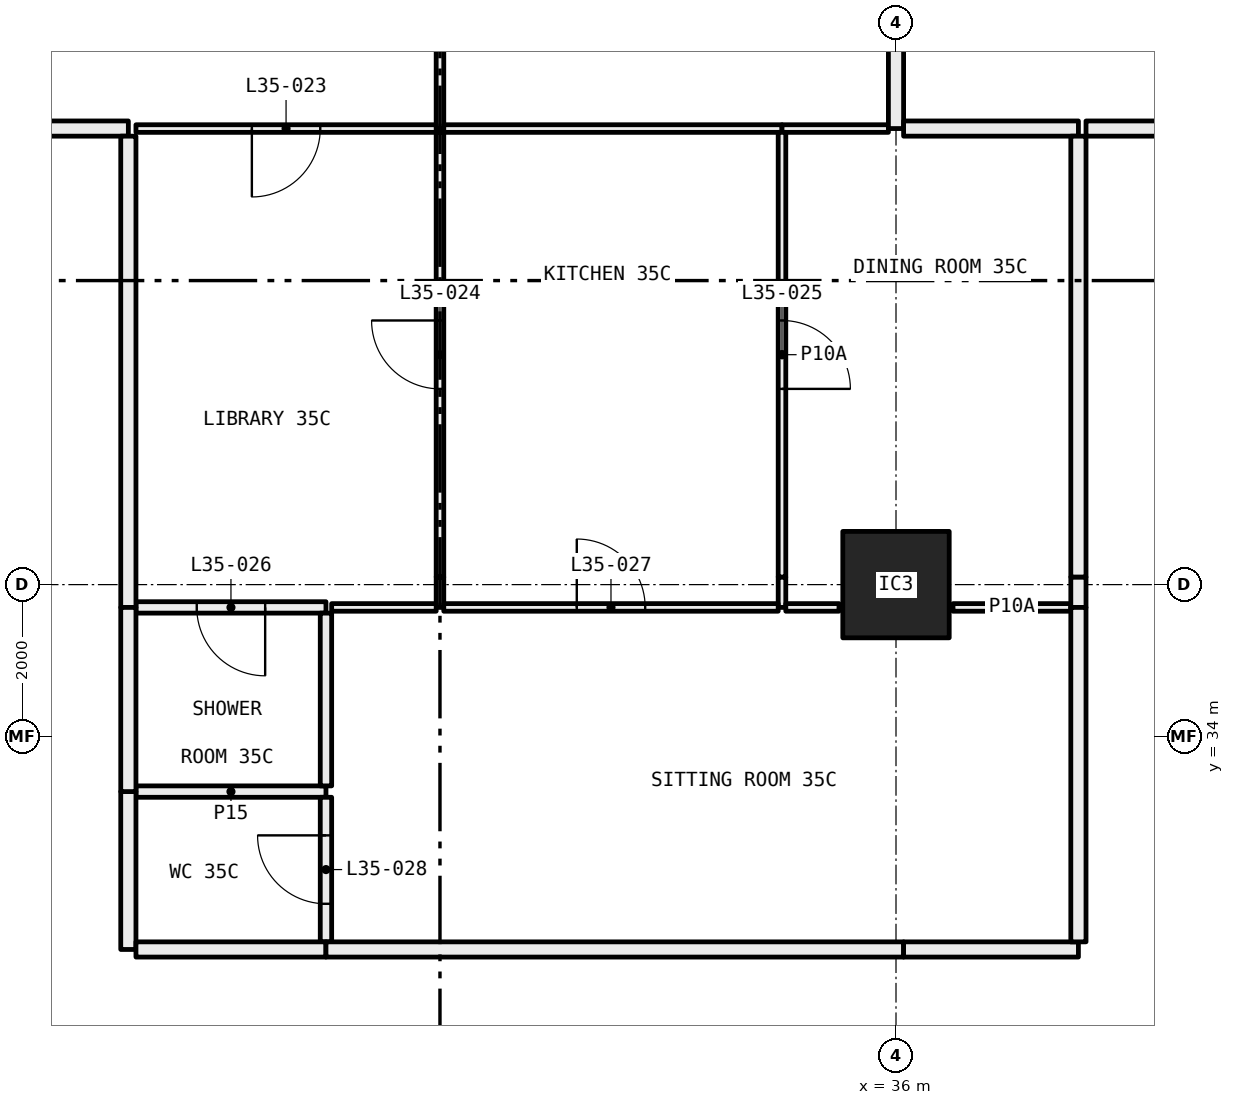
"""IFC4 building model, lengths in metres.
Left out: names, types, materials, properties, quantities, classifications, styles, units other than length and angle.
Written with IfcOpenShell. Run it as: python <this file> out.ifc"""

import sys

from ifc_helpers import new_model, si_unit, direction, frame, frame_2d, origin, origin_2d, place, context, subcontext, project, spatial, rectangle, hollow_rectangle, extrude, element, fill, save


model = new_model("IFC4")
c1 = context("Model", 3, precision=1e-05, world=origin(), true_north=direction((0.0, 1.0)))
c2 = subcontext(c1, "Body", "Model", "MODEL_VIEW")
j1 = project(units=[si_unit("LENGTHUNIT", "METRE"), si_unit("PLANEANGLEUNIT", "RADIAN")], contexts=[c1])
p1 = place(None, origin())
s1 = spatial("IfcSite", under=j1, at=p1, CompositionType="ELEMENT")
p2 = place(p1, origin())
s2 = spatial("IfcBuilding", under=s1, at=p2, CompositionType="ELEMENT")
p3 = place(p2, frame((0.0, 0.0, 134.55)))
s3 = spatial("IfcBuildingStorey", under=s2, at=p3, CompositionType="ELEMENT", Elevation=134.55)
p4 = place(p3, frame((36.0, 36.0, 0.0), z_axis=(0.0, 0.0, 1.0), x_axis=(1.0, 0.0, 0.0)))
e1 = element("IfcColumn", 1, at=p4, inside=s3, PredefinedType="COLUMN", context=c2, shape_type="SweptSolid", body=[
    extrude(hollow_rectangle(XDim=1.4, YDim=1.4, WallThickness=0.06, at=origin_2d()), origin(), (0.0, 0.0, 1.0), 3.05),
])
p5 = place(p3, frame((30.0, 42.0, 0.0), z_axis=(0.0, 0.0, 1.0), x_axis=(0.0, 1.0, 0.0)))
e2 = element("IfcWall", 2, at=p5, inside=s3, PredefinedType="PARTITIONING", context=c2, shape_type="SweptSolid", body=[
    extrude(rectangle(XDim=5.28, YDim=0.1, at=frame_2d((2.64, 0.0))), origin(), (0.0, 0.0, 1.0), 3.05),
])
p6 = place(p5, frame((2.19, 0.0, 0.0)))
e3 = element("IfcOpeningElement", 3, at=p6, cuts=e2, PredefinedType="OPENING", context=c2, shape_type="SweptSolid", body=[
    extrude(rectangle(XDim=0.9, YDim=2.1, at=frame_2d((0.45, 1.05))), frame((0.0, 0.06, 0.0), z_axis=(0.0, -1.0, 0.0), x_axis=(1.0, 0.0, 0.0)), (0.0, 0.0, 1.0), 0.12),
])
p7 = place(p3, frame((26.0, 42.0, 0.0), z_axis=(0.0, 0.0, 1.0), x_axis=(1.0, 0.0, 0.0)))
e4 = element("IfcWall", 4, at=p7, inside=s3, PredefinedType="PARTITIONING", context=c2, shape_type="SweptSolid", body=[
    extrude(rectangle(XDim=3.95, YDim=0.1, at=frame_2d((1.975, 0.0))), origin(), (0.0, 0.0, 1.0), 3.05),
])
p8 = place(p7, frame((1.525, 0.0, 0.0)))
e5 = element("IfcOpeningElement", 5, at=p8, cuts=e4, PredefinedType="OPENING", context=c2, shape_type="SweptSolid", body=[
    extrude(rectangle(XDim=0.9, YDim=2.1, at=frame_2d((0.45, 1.05))), frame((0.0, 0.06, 0.0), z_axis=(0.0, -1.0, 0.0), x_axis=(1.0, 0.0, 0.0)), (0.0, 0.0, 1.0), 0.12),
])
p9 = place(p3, frame((24.0, 42.0, 0.0), z_axis=(0.0, 0.0, 1.0), x_axis=(1.0, 0.0, 0.0)))
e6 = element("IfcWall", 6, at=p9, inside=s3, PredefinedType="PARTITIONING", context=c2, shape_type="SweptSolid", body=[
    extrude(rectangle(XDim=1.9, YDim=0.2, at=frame_2d((0.95, 0.0))), origin(), (0.0, 0.0, 1.0), 3.05),
])
p10 = place(p3, frame((30.05, 42.0, 0.0), z_axis=(0.0, 0.0, 1.0), x_axis=(1.0, 0.0, 0.0)))
e7 = element("IfcWall", 7, at=p10, inside=s3, PredefinedType="PARTITIONING", context=c2, shape_type="SweptSolid", body=[
    extrude(rectangle(XDim=4.45, YDim=0.1, at=frame_2d((2.225, 0.0))), origin(), (0.0, 0.0, 1.0), 3.05),
])
p11 = place(p3, frame((34.5, 42.0, 0.0), z_axis=(0.0, 0.0, 1.0), x_axis=(1.0, 0.0, 0.0)))
e8 = element("IfcWall", 8, at=p11, inside=s3, PredefinedType="PARTITIONING", context=c2, shape_type="SweptSolid", body=[
    extrude(rectangle(XDim=1.4, YDim=0.1, at=frame_2d((0.7, 0.0))), origin(), (0.0, 0.0, 1.0), 3.05),
])
p12 = place(p3, frame((36.0, 42.0, 0.0), z_axis=(0.0, 0.0, 1.0), x_axis=(0.0, 1.0, 0.0)))
e9 = element("IfcWall", 9, at=p12, inside=s3, PredefinedType="PARTITIONING", context=c2, shape_type="SweptSolid", body=[
    extrude(rectangle(XDim=5.28, YDim=0.2, at=frame_2d((2.64, 0.0))), origin(), (0.0, 0.0, 1.0), 2.45),
])
p13 = place(p3, frame((30.0, 35.7, 0.0), z_axis=(0.0, 0.0, 1.0), x_axis=(0.0, 1.0, 0.0)))
e10 = element("IfcWall", 10, at=p13, inside=s3, PredefinedType="PARTITIONING", context=c2, shape_type="SweptSolid", body=[
    extrude(rectangle(XDim=0.4, YDim=0.1, at=frame_2d((0.2, 0.0))), origin(), (0.0, 0.0, 1.0), 2.45),
])
p14 = place(p3, frame((30.0, 36.1, 0.0), z_axis=(0.0, 0.0, 1.0), x_axis=(0.0, 1.0, 0.0)))
e11 = element("IfcWall", 11, at=p14, inside=s3, PredefinedType="PARTITIONING", context=c2, shape_type="SweptSolid", body=[
    extrude(rectangle(XDim=5.85, YDim=0.1, at=frame_2d((2.925, 0.0))), origin(), (0.0, 0.0, 1.0), 3.05),
])
p15 = place(p14, frame((2.475, 0.0, 0.0)))
e12 = element("IfcOpeningElement", 12, at=p15, cuts=e11, PredefinedType="OPENING", context=c2, shape_type="SweptSolid", body=[
    extrude(rectangle(XDim=0.9, YDim=2.1, at=frame_2d((0.45, 1.05))), frame((0.0, 0.06, 0.0), z_axis=(0.0, -1.0, 0.0), x_axis=(1.0, 0.0, 0.0)), (0.0, 0.0, 1.0), 0.12),
])
p16 = place(p3, frame((26.0, 35.7, 0.0), z_axis=(0.0, 0.0, 1.0), x_axis=(1.0, 0.0, 0.0)))
e13 = element("IfcWall", 13, at=p16, inside=s3, PredefinedType="PARTITIONING", context=c2, shape_type="SweptSolid", body=[
    extrude(rectangle(XDim=2.5, YDim=0.15, at=frame_2d((1.25, 0.0))), origin(), (0.0, 0.0, 1.0), 3.05),
])
p17 = place(p16, frame((0.8, 0.0, 0.0)))
e14 = element("IfcOpeningElement", 14, at=p17, cuts=e13, PredefinedType="OPENING", context=c2, shape_type="SweptSolid", body=[
    extrude(rectangle(XDim=0.9, YDim=2.1, at=frame_2d((0.45, 1.05))), frame((0.0, 0.085, 0.0), z_axis=(0.0, -1.0, 0.0), x_axis=(1.0, 0.0, 0.0)), (0.0, 0.0, 1.0), 0.17),
])
p18 = place(p3, frame((28.575, 35.7, 0.0), z_axis=(0.0, 0.0, 1.0), x_axis=(1.0, 0.0, 0.0)))
e15 = element("IfcWall", 15, at=p18, inside=s3, PredefinedType="PARTITIONING", context=c2, shape_type="SweptSolid", body=[
    extrude(rectangle(XDim=1.375, YDim=0.1, at=frame_2d((0.688, 0.0))), origin(), (0.0, 0.0, 1.0), 3.05),
])
p19 = place(p3, frame((25.9, 41.9, 0.0), z_axis=(0.0, 0.0, 1.0), x_axis=(0.0, -1.0, 0.0)))
e16 = element("IfcWall", 16, at=p19, inside=s3, PredefinedType="PARTITIONING", context=c2, shape_type="SweptSolid", body=[
    extrude(rectangle(XDim=6.2, YDim=0.2, at=frame_2d((3.1, 0.0))), origin(), (0.0, 0.0, 1.0), 2.45),
])
p20 = place(p3, frame((34.5, 35.7, 0.0), z_axis=(0.0, 0.0, 1.0), x_axis=(0.0, 1.0, 0.0)))
e17 = element("IfcWall", 17, at=p20, inside=s3, PredefinedType="PARTITIONING", context=c2, shape_type="SweptSolid", body=[
    extrude(rectangle(XDim=0.4, YDim=0.1, at=frame_2d((0.2, 0.0))), origin(), (0.0, 0.0, 1.0), 2.45),
])
p21 = place(p3, frame((34.5, 36.1, 0.0), z_axis=(0.0, 0.0, 1.0), x_axis=(0.0, 1.0, 0.0)))
e18 = element("IfcWall", 18, at=p21, inside=s3, PredefinedType="PARTITIONING", context=c2, shape_type="SweptSolid", body=[
    extrude(rectangle(XDim=5.85, YDim=0.1, at=frame_2d((2.925, 0.0))), origin(), (0.0, 0.0, 1.0), 3.05),
])
p22 = place(p21, frame((2.475, 0.0, 0.0)))
e19 = element("IfcOpeningElement", 19, at=p22, cuts=e18, PredefinedType="OPENING", context=c2, shape_type="SweptSolid", body=[
    extrude(rectangle(XDim=0.9, YDim=2.1, at=frame_2d((0.45, 1.05))), frame((0.0, 0.06, 0.0), z_axis=(0.0, -1.0, 0.0), x_axis=(1.0, 0.0, 0.0)), (0.0, 0.0, 1.0), 0.12),
])
p23 = place(p3, frame((30.05, 35.7, 0.0), z_axis=(0.0, 0.0, 1.0), x_axis=(1.0, 0.0, 0.0)))
e20 = element("IfcWall", 20, at=p23, inside=s3, PredefinedType="PARTITIONING", context=c2, shape_type="SweptSolid", body=[
    extrude(rectangle(XDim=4.4, YDim=0.1, at=frame_2d((2.2, 0.0))), origin(), (0.0, 0.0, 1.0), 3.05),
])
p24 = place(p23, frame((1.75, 0.0, 0.0)))
e21 = element("IfcOpeningElement", 21, at=p24, cuts=e20, PredefinedType="OPENING", context=c2, shape_type="SweptSolid", body=[
    extrude(rectangle(XDim=0.9, YDim=2.1, at=frame_2d((0.45, 1.05))), frame((0.0, 0.06, 0.0), z_axis=(0.0, -1.0, 0.0), x_axis=(1.0, 0.0, 0.0)), (0.0, 0.0, 1.0), 0.12),
])
p25 = place(p3, frame((34.55, 35.7, 0.0), z_axis=(0.0, 0.0, 1.0), x_axis=(1.0, 0.0, 0.0)))
e22 = element("IfcWall", 22, at=p25, inside=s3, PredefinedType="PARTITIONING", context=c2, shape_type="SweptSolid", body=[
    extrude(rectangle(XDim=0.7, YDim=0.1, at=frame_2d((0.35, 0.0))), origin(), (0.0, 0.0, 1.0), 3.05),
])
p26 = place(p3, frame((36.75, 35.7, 0.0), z_axis=(0.0, 0.0, 1.0), x_axis=(1.0, 0.0, 0.0)))
e23 = element("IfcWall", 23, at=p26, inside=s3, PredefinedType="PARTITIONING", context=c2, shape_type="SweptSolid", body=[
    extrude(rectangle(XDim=1.55, YDim=0.1, at=frame_2d((0.775, 0.0))), origin(), (0.0, 0.0, 1.0), 3.05),
])
p27 = place(p3, frame((38.4, 42.0, 0.0), z_axis=(0.0, 0.0, 1.0), x_axis=(-1.0, 0.0, 0.0)))
e24 = element("IfcWall", 24, at=p27, inside=s3, PredefinedType="PARTITIONING", context=c2, shape_type="SweptSolid", body=[
    extrude(rectangle(XDim=2.3, YDim=0.2, at=frame_2d((1.15, 0.0))), origin(), (0.0, 0.0, 1.0), 3.05),
])
p28 = place(p3, frame((38.4, 35.7, 0.0), z_axis=(0.0, 0.0, 1.0), x_axis=(0.0, 1.0, 0.0)))
e25 = element("IfcWall", 25, at=p28, inside=s3, PredefinedType="PARTITIONING", context=c2, shape_type="SweptSolid", body=[
    extrude(rectangle(XDim=0.4, YDim=0.2, at=frame_2d((0.2, 0.0))), origin(), (0.0, 0.0, 1.0), 2.45),
])
p29 = place(p3, frame((38.4, 36.1, 0.0), z_axis=(0.0, 0.0, 1.0), x_axis=(0.0, 1.0, 0.0)))
e26 = element("IfcWall", 26, at=p29, inside=s3, PredefinedType="PARTITIONING", context=c2, shape_type="SweptSolid", body=[
    extrude(rectangle(XDim=5.8, YDim=0.2, at=frame_2d((2.9, 0.0))), origin(), (0.0, 0.0, 1.0), 3.05),
])
p30 = place(p3, frame((28.5, 33.277, 0.0), z_axis=(0.0, 0.0, 1.0), x_axis=(-1.0, 0.0, 0.0)))
e27 = element("IfcWall", 27, at=p30, inside=s3, PredefinedType="PARTITIONING", context=c2, shape_type="SweptSolid", body=[
    extrude(rectangle(XDim=2.5, YDim=0.15, at=frame_2d((1.25, 0.0))), origin(), (0.0, 0.0, 1.0), 3.05),
])
p31 = place(p3, frame((28.5, 31.3, 0.0), z_axis=(0.0, 0.0, 1.0), x_axis=(0.0, 1.0, 0.0)))
e28 = element("IfcWall", 28, at=p31, inside=s3, PredefinedType="PARTITIONING", context=c2, shape_type="SweptSolid", body=[
    extrude(rectangle(XDim=1.902, YDim=0.15, at=frame_2d((0.951, 0.0))), origin(), (0.0, 0.0, 1.0), 3.05),
])
p32 = place(p31, frame((0.501, 0.0, 0.0)))
e29 = element("IfcOpeningElement", 29, at=p32, cuts=e28, PredefinedType="OPENING", context=c2, shape_type="SweptSolid", body=[
    extrude(rectangle(XDim=0.9, YDim=2.1, at=frame_2d((0.45, 1.05))), frame((0.0, 0.085, 0.0), z_axis=(0.0, -1.0, 0.0), x_axis=(1.0, 0.0, 0.0)), (0.0, 0.0, 1.0), 0.17),
])
p33 = place(p3, frame((25.9, 33.277, 0.0), z_axis=(0.0, 0.0, 1.0), x_axis=(0.0, -1.0, 0.0)))
e30 = element("IfcWall", 30, at=p33, inside=s3, PredefinedType="PARTITIONING", context=c2, shape_type="SweptSolid", body=[
    extrude(rectangle(XDim=2.077, YDim=0.2, at=frame_2d((1.039, 0.0))), origin(), (0.0, 0.0, 1.0), 3.05),
])
p34 = place(p3, frame((26.0, 31.2, 0.0), z_axis=(0.0, 0.0, 1.0), x_axis=(1.0, 0.0, 0.0)))
e31 = element("IfcWall", 31, at=p34, inside=s3, PredefinedType="PARTITIONING", context=c2, shape_type="SweptSolid", body=[
    extrude(rectangle(XDim=2.5, YDim=0.2, at=frame_2d((1.25, 0.0))), origin(), (0.0, 0.0, 1.0), 3.05),
])
p35 = place(p3, frame((28.5, 33.352, 0.0), z_axis=(0.0, 0.0, 1.0), x_axis=(0.0, 1.0, 0.0)))
e32 = element("IfcWall", 32, at=p35, inside=s3, PredefinedType="PARTITIONING", context=c2, shape_type="SweptSolid", body=[
    extrude(rectangle(XDim=2.273, YDim=0.15, at=frame_2d((1.136, 0.0))), origin(), (0.0, 0.0, 1.0), 3.05),
])
p36 = place(p3, frame((25.9, 35.7, 0.0), z_axis=(0.0, 0.0, 1.0), x_axis=(0.0, -1.0, 0.0)))
e33 = element("IfcWall", 33, at=p36, inside=s3, PredefinedType="PARTITIONING", context=c2, shape_type="SweptSolid", body=[
    extrude(rectangle(XDim=2.423, YDim=0.2, at=frame_2d((1.211, 0.0))), origin(), (0.0, 0.0, 1.0), 3.05),
])
p37 = place(p3, frame((28.5, 31.2, 0.0), z_axis=(0.0, 0.0, 1.0), x_axis=(1.0, 0.0, 0.0)))
e34 = element("IfcWall", 34, at=p37, inside=s3, PredefinedType="PARTITIONING", context=c2, shape_type="SweptSolid", body=[
    extrude(rectangle(XDim=7.6, YDim=0.2, at=frame_2d((3.8, 0.0))), origin(), (0.0, 0.0, 1.0), 2.45),
])
p38 = place(p3, frame((36.1, 31.2, 0.0), z_axis=(0.0, 0.0, 1.0), x_axis=(1.0, 0.0, 0.0)))
e35 = element("IfcWall", 35, at=p38, inside=s3, PredefinedType="PARTITIONING", context=c2, shape_type="SweptSolid", body=[
    extrude(rectangle(XDim=2.3, YDim=0.2, at=frame_2d((1.15, 0.0))), origin(), (0.0, 0.0, 1.0), 3.05),
])
p39 = place(p3, frame((38.4, 31.3, 0.0), z_axis=(0.0, 0.0, 1.0), x_axis=(0.0, 1.0, 0.0)))
e36 = element("IfcWall", 36, at=p39, inside=s3, PredefinedType="PARTITIONING", context=c2, shape_type="SweptSolid", body=[
    extrude(rectangle(XDim=4.4, YDim=0.2, at=frame_2d((2.2, 0.0))), origin(), (0.0, 0.0, 1.0), 3.05),
])
p40 = place(p3, frame((38.5, 42.0, 0.0), z_axis=(0.0, 0.0, 1.0), x_axis=(1.0, 0.0, 0.0)))
e37 = element("IfcWall", 37, at=p40, inside=s3, PredefinedType="PARTITIONING", context=c2, shape_type="SweptSolid", body=[
    extrude(rectangle(XDim=2.3, YDim=0.2, at=frame_2d((1.15, 0.0))), origin(), (0.0, 0.0, 1.0), 3.05),
])
p41 = place(p8, frame((0.9, 0.0, 0.0), x_axis=(-1.0, 0.0, 0.0)))
e38 = element("IfcDoor", 38, at=p41, inside=s3, OperationType="SINGLE_SWING_LEFT", PredefinedType="DOOR", context=c2, shape_type="SweptSolid", body=[
    extrude(rectangle(XDim=0.9, YDim=2.1, at=frame_2d((0.45, 1.05))), frame((0.0, 0.025, 0.0), z_axis=(0.0, -1.0, 0.0), x_axis=(1.0, 0.0, 0.0)), (0.0, 0.0, 1.0), 0.05),
])
fill(e5, e38)
p42 = place(p15, origin())
e39 = element("IfcDoor", 39, at=p42, inside=s3, OperationType="SINGLE_SWING_LEFT", PredefinedType="DOOR", context=c2, shape_type="SweptSolid", body=[
    extrude(rectangle(XDim=0.9, YDim=2.1, at=frame_2d((0.45, 1.05))), frame((0.0, 0.025, 0.0), z_axis=(0.0, -1.0, 0.0), x_axis=(1.0, 0.0, 0.0)), (0.0, 0.0, 1.0), 0.05),
])
fill(e12, e39)
p43 = place(p22, frame((0.9, 0.0, 0.0), x_axis=(-1.0, 0.0, 0.0)))
e40 = element("IfcDoor", 40, at=p43, inside=s3, OperationType="SINGLE_SWING_LEFT", PredefinedType="DOOR", context=c2, shape_type="SweptSolid", body=[
    extrude(rectangle(XDim=0.9, YDim=2.1, at=frame_2d((0.45, 1.05))), frame((0.0, 0.025, 0.0), z_axis=(0.0, -1.0, 0.0), x_axis=(1.0, 0.0, 0.0)), (0.0, 0.0, 1.0), 0.05),
])
fill(e19, e40)
p44 = place(p17, frame((0.9, 0.0, 0.0), x_axis=(-1.0, 0.0, 0.0)))
e41 = element("IfcDoor", 41, at=p44, inside=s3, OperationType="SINGLE_SWING_RIGHT", PredefinedType="DOOR", context=c2, shape_type="SweptSolid", body=[
    extrude(rectangle(XDim=0.9, YDim=2.1, at=frame_2d((0.45, 1.05))), frame((0.0, 0.025, 0.0), z_axis=(0.0, -1.0, 0.0), x_axis=(1.0, 0.0, 0.0)), (0.0, 0.0, 1.0), 0.05),
])
fill(e14, e41)
p45 = place(p24, origin())
e42 = element("IfcDoor", 42, at=p45, inside=s3, OperationType="SINGLE_SWING_RIGHT", PredefinedType="DOOR", context=c2, shape_type="SweptSolid", body=[
    extrude(rectangle(XDim=0.9, YDim=2.1, at=frame_2d((0.45, 1.05))), frame((0.0, 0.025, 0.0), z_axis=(0.0, -1.0, 0.0), x_axis=(1.0, 0.0, 0.0)), (0.0, 0.0, 1.0), 0.05),
])
fill(e21, e42)
p46 = place(p32, origin())
e43 = element("IfcDoor", 43, at=p46, inside=s3, OperationType="SINGLE_SWING_LEFT", PredefinedType="DOOR", context=c2, shape_type="SweptSolid", body=[
    extrude(rectangle(XDim=0.9, YDim=2.1, at=frame_2d((0.45, 1.05))), frame((0.0, 0.025, 0.0), z_axis=(0.0, -1.0, 0.0), x_axis=(1.0, 0.0, 0.0)), (0.0, 0.0, 1.0), 0.05),
])
fill(e29, e43)
save(model, sys.argv[1])
